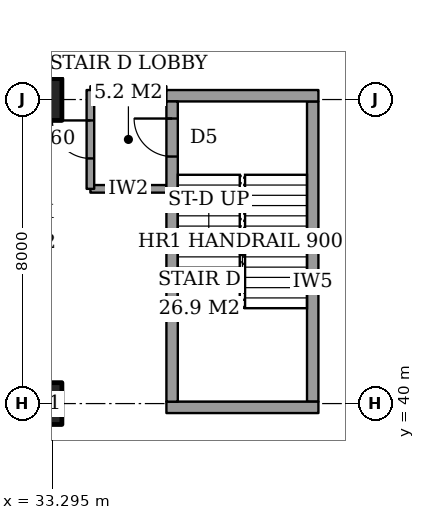
"""IFC4 building model, lengths in metres.
Left out: names, types, materials, properties, quantities, classifications, styles, units other than length and angle.
Written with IfcOpenShell. Run it as: python <this file> out.ifc"""

import sys

from ifc_helpers import new_model, si_unit, direction, frame, frame_2d, origin, origin_2d, place, context, subcontext, project, spatial, rectangle, extrude, element, fill, save


model = new_model("IFC4")
c1 = context("Model", 3, precision=1e-05, world=origin(), true_north=direction((0.0, 1.0)))
c2 = subcontext(c1, "Body", "Model", "MODEL_VIEW")
j1 = project(units=[si_unit("LENGTHUNIT", "METRE"), si_unit("PLANEANGLEUNIT", "RADIAN")], contexts=[c1])
p1 = place(None, origin())
s1 = spatial("IfcSite", under=j1, at=p1, CompositionType="ELEMENT")
p2 = place(p1, origin())
s2 = spatial("IfcBuilding", under=s1, at=p2, CompositionType="ELEMENT")
p3 = place(p2, frame((0.0, 0.0, -5.0)))
s3 = spatial("IfcBuildingStorey", under=s2, at=p3, CompositionType="ELEMENT", Elevation=-5.0)
for number, where, z_axis, x_axis in (
    (1, (33.0, 40.0, 0.0), (0.0, 0.0, 1.0), (1.0, 0.0, 0.0)),
    (2, (33.0, 48.0, 0.0), (0.0, 0.0, 1.0), (1.0, 0.0, 0.0)),
):
    element("IfcColumn", number, at=place(p3, frame(where, z_axis=z_axis, x_axis=x_axis)), inside=s3, PredefinedType="COLUMN", context=c2, shape_type="SweptSolid", body=[
        extrude(rectangle(XDim=1.1, YDim=1.1, at=origin_2d()), origin(), (0.0, 0.0, 1.0), 5.0),
    ])
for number, where, z_axis, x_axis in (
    (3, (34.3, 45.65, 0.0), (0.0, 0.0, 1.0), (1.0, 0.0, 0.0)),
    (4, (34.3, 48.25, 0.0), (0.0, 0.0, 1.0), (1.0, 0.0, 0.0)),
):
    element("IfcWall", number, at=place(p3, frame(where, z_axis=z_axis, x_axis=x_axis)), inside=s3, PredefinedType="PARTITIONING", context=c2, shape_type="SweptSolid", body=[
        extrude(rectangle(XDim=2.0, YDim=0.2, at=frame_2d((1.0, 0.0))), origin(), (0.0, 0.0, 1.0), 4.7),
    ])
p4 = place(p3, frame((34.3, 45.65, 0.0), z_axis=(0.0, 0.0, 1.0), x_axis=(0.0, 1.0, 0.0)))
e5 = element("IfcWall", 5, at=p4, inside=s3, PredefinedType="PARTITIONING", context=c2, shape_type="SweptSolid", body=[
    extrude(rectangle(XDim=2.6, YDim=0.2, at=frame_2d((1.3, 0.0))), origin(), (0.0, 0.0, 1.0), 4.7),
])
p5 = place(p4, frame((0.8, 0.0, 0.0)))
e6 = element("IfcOpeningElement", 6, at=p5, cuts=e5, PredefinedType="OPENING", context=c2, shape_type="SweptSolid", body=[
    extrude(rectangle(XDim=1.0, YDim=2.1, at=frame_2d((0.5, 1.05))), frame((0.0, 0.11, 0.0), z_axis=(0.0, -1.0, 0.0), x_axis=(1.0, 0.0, 0.0)), (0.0, 0.0, 1.0), 0.22),
])
for number, where, z_axis, x_axis in (
    (7, (36.3, 39.9, 0.0), (0.0, 0.0, 1.0), (1.0, 0.0, 0.0)),
    (8, (36.3, 48.1, 0.0), (0.0, 0.0, 1.0), (1.0, 0.0, 0.0)),
):
    element("IfcWall", number, at=place(p3, frame(where, z_axis=z_axis, x_axis=x_axis)), inside=s3, PredefinedType="PARTITIONING", context=c2, shape_type="SweptSolid", body=[
        extrude(rectangle(XDim=4.0, YDim=0.3, at=frame_2d((2.0, 0.0))), origin(), (0.0, 0.0, 1.0), 5.0),
    ])
p6 = place(p3, frame((36.45, 40.05, 0.0), z_axis=(0.0, 0.0, 1.0), x_axis=(0.0, 1.0, 0.0)))
e9 = element("IfcWall", 9, at=p6, inside=s3, PredefinedType="PARTITIONING", context=c2, shape_type="SweptSolid", body=[
    extrude(rectangle(XDim=7.9, YDim=0.3, at=frame_2d((3.95, 0.0))), origin(), (0.0, 0.0, 1.0), 5.0),
])
p7 = place(p6, frame((6.45, 0.0, 0.0)))
e10 = element("IfcOpeningElement", 10, at=p7, cuts=e9, PredefinedType="OPENING", context=c2, shape_type="SweptSolid", body=[
    extrude(rectangle(XDim=1.0, YDim=2.1, at=frame_2d((0.5, 1.05))), frame((0.0, 0.16, 0.0), z_axis=(0.0, -1.0, 0.0), x_axis=(1.0, 0.0, 0.0)), (0.0, 0.0, 1.0), 0.32),
])
p8 = place(p3, frame((40.15, 40.05, 0.0), z_axis=(0.0, 0.0, 1.0), x_axis=(0.0, 1.0, 0.0)))
e11 = element("IfcWall", 11, at=p8, inside=s3, PredefinedType="PARTITIONING", context=c2, shape_type="SweptSolid", body=[
    extrude(rectangle(XDim=7.9, YDim=0.3, at=frame_2d((3.95, 0.0))), origin(), (0.0, 0.0, 1.0), 5.0),
])
p9 = place(p5, origin())
e12 = element("IfcDoor", 12, at=p9, inside=s3, OperationType="SINGLE_SWING_LEFT", PredefinedType="DOOR", context=c2, shape_type="SweptSolid", body=[
    extrude(rectangle(XDim=1.0, YDim=2.1, at=frame_2d((0.5, 1.05))), frame((0.0, 0.025, 0.0), z_axis=(0.0, -1.0, 0.0), x_axis=(1.0, 0.0, 0.0)), (0.0, 0.0, 1.0), 0.05),
])
fill(e6, e12)
p10 = place(p7, origin())
e13 = element("IfcDoor", 13, at=p10, inside=s3, OperationType="SINGLE_SWING_LEFT", PredefinedType="DOOR", context=c2, shape_type="SweptSolid", body=[
    extrude(rectangle(XDim=1.0, YDim=2.1, at=frame_2d((0.5, 1.05))), frame((0.0, 0.025, 0.0), z_axis=(0.0, -1.0, 0.0), x_axis=(1.0, 0.0, 0.0)), (0.0, 0.0, 1.0), 0.05),
])
fill(e10, e13)
save(model, sys.argv[1])
